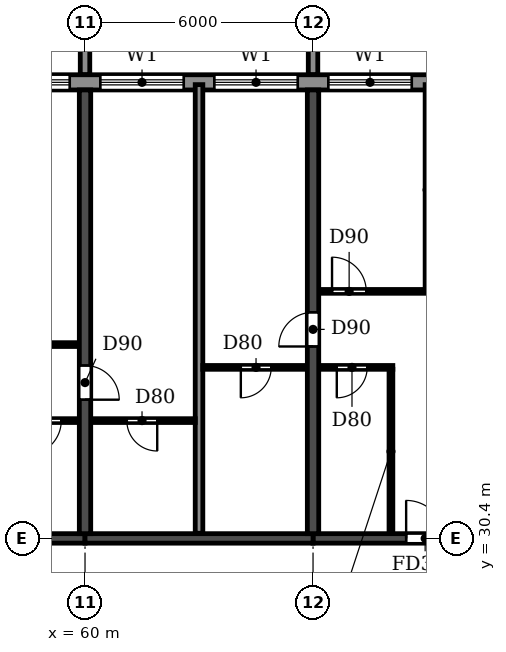
"""IFC4 building model, lengths in metres.
Left out: names, types, materials, properties, quantities, classifications, styles, units other than length and angle.
Written with IfcOpenShell. Run it as: python <this file> out.ifc"""

import sys

from ifc_helpers import new_model, si_unit, direction, frame, frame_2d, origin, place, context, subcontext, project, spatial, polyline, rectangle, outline, extrude, source, transform, mapped, element, fill, save


model = new_model("IFC4")
c1 = context("Model", 3, precision=1e-05, world=origin(), true_north=direction((0.0, 1.0)))
c2 = subcontext(c1, "Body", "Model", "MODEL_VIEW")
j1 = project(units=[si_unit("LENGTHUNIT", "METRE"), si_unit("PLANEANGLEUNIT", "RADIAN")], contexts=[c1])
p1 = place(None, origin())
s1 = spatial("IfcSite", under=j1, at=p1, CompositionType="ELEMENT")
p2 = place(p1, origin())
s2 = spatial("IfcBuilding", under=s1, at=p2, CompositionType="ELEMENT")
p3 = place(p2, frame((0.0, 0.0, 142.2)))
s3 = spatial("IfcBuildingStorey", under=s2, at=p3, CompositionType="ELEMENT", Elevation=142.2)
p4 = place(p3, frame((60.0, 30.525, 0.0), z_axis=(0.0, 0.0, 1.0), x_axis=(0.0, 1.0, 0.0)))
e1 = element("IfcWall", 1, at=p4, inside=s3, PredefinedType="SHEAR", context=c2, shape_type="SweptSolid", body=[
    extrude(rectangle(XDim=11.675, YDim=0.3, at=frame_2d((5.837, 0.0))), origin(), (0.0, 0.0, 1.0), 3.07),
])
p5 = place(p4, frame((3.525, 0.0, 0.0)))
e2 = element("IfcOpeningElement", 2, at=p5, cuts=e1, PredefinedType="OPENING", context=c2, shape_type="SweptSolid", body=[
    extrude(rectangle(XDim=0.9, YDim=2.1, at=frame_2d((0.45, 1.05))), frame((0.0, 0.16, 0.0), z_axis=(0.0, -1.0, 0.0), x_axis=(1.0, 0.0, 0.0)), (0.0, 0.0, 1.0), 0.32),
])
p6 = place(p3, frame((66.0, 30.525, 0.0), z_axis=(0.0, 0.0, 1.0), x_axis=(0.0, 1.0, 0.0)))
e3 = element("IfcWall", 3, at=p6, inside=s3, PredefinedType="SHEAR", context=c2, shape_type="SweptSolid", body=[
    extrude(rectangle(XDim=11.675, YDim=0.3, at=frame_2d((5.837, 0.0))), origin(), (0.0, 0.0, 1.0), 3.07),
])
p7 = place(p6, frame((4.925, 0.0, 0.0)))
e4 = element("IfcOpeningElement", 4, at=p7, cuts=e3, PredefinedType="OPENING", context=c2, shape_type="SweptSolid", body=[
    extrude(rectangle(XDim=0.9, YDim=2.1, at=frame_2d((0.45, 1.05))), frame((0.0, 0.16, 0.0), z_axis=(0.0, -1.0, 0.0), x_axis=(1.0, 0.0, 0.0)), (0.0, 0.0, 1.0), 0.32),
])
p8 = place(p3, frame((54.0, 30.4, 0.0), z_axis=(0.0, 0.0, 1.0), x_axis=(1.0, 0.0, 0.0)))
e5 = element("IfcWall", 5, at=p8, inside=s3, PredefinedType="SHEAR", context=c2, shape_type="SweptSolid", body=[
    extrude(rectangle(XDim=6.0, YDim=0.25, at=frame_2d((3.0, 0.0))), origin(), (0.0, 0.0, 1.0), 2.47),
])
p9 = place(p8, frame((2.45, 0.0, 0.0)))
e6 = element("IfcOpeningElement", 6, at=p9, cuts=e5, PredefinedType="OPENING", context=c2, shape_type="SweptSolid", body=[
    extrude(rectangle(XDim=1.0, YDim=2.1, at=frame_2d((0.5, 1.05))), frame((0.0, 0.135, 0.0), z_axis=(0.0, -1.0, 0.0), x_axis=(1.0, 0.0, 0.0)), (0.0, 0.0, 1.0), 0.27),
])
p10 = place(p3, frame((60.0, 30.4, 0.0), z_axis=(0.0, 0.0, 1.0), x_axis=(1.0, 0.0, 0.0)))
e7 = element("IfcWall", 7, at=p10, inside=s3, PredefinedType="SHEAR", context=c2, shape_type="SweptSolid", body=[
    extrude(rectangle(XDim=6.0, YDim=0.25, at=frame_2d((3.0, 0.0))), origin(), (0.0, 0.0, 1.0), 2.47),
])
p11 = place(p3, frame((66.0, 30.4, 0.0), z_axis=(0.0, 0.0, 1.0), x_axis=(1.0, 0.0, 0.0)))
e8 = element("IfcWall", 8, at=p11, inside=s3, PredefinedType="SHEAR", context=c2, shape_type="SweptSolid", body=[
    extrude(rectangle(XDim=6.0, YDim=0.25, at=frame_2d((3.0, 0.0))), origin(), (0.0, 0.0, 1.0), 2.47),
])
p12 = place(p11, frame((2.45, 0.0, 0.0)))
e9 = element("IfcOpeningElement", 9, at=p12, cuts=e8, PredefinedType="OPENING", context=c2, shape_type="SweptSolid", body=[
    extrude(rectangle(XDim=1.0, YDim=2.1, at=frame_2d((0.5, 1.05))), frame((0.0, 0.135, 0.0), z_axis=(0.0, -1.0, 0.0), x_axis=(1.0, 0.0, 0.0)), (0.0, 0.0, 1.0), 0.27),
])
p13 = place(p3, frame((85.317, 42.4, 0.0), z_axis=(0.0, 0.0, 1.0), x_axis=(-1.0, 0.0, 0.0)))
e10 = element("IfcWall", 10, at=p13, inside=s3, PredefinedType="STANDARD", context=c2, shape_type="SweptSolid", body=[
    extrude(rectangle(XDim=68.634, YDim=0.4, at=frame_2d((34.317, 0.0))), origin(), (0.0, 0.0, 1.0), 3.07),
])
p14 = place(p13, frame((64.717, 0.0, 0.9)))
e11 = element("IfcOpeningElement", 11, at=p14, cuts=e10, PredefinedType="OPENING", context=c2, shape_type="SweptSolid", body=[
    extrude(rectangle(XDim=2.2, YDim=1.5, at=frame_2d((1.1, 0.75))), frame((0.0, 0.21, 0.0), z_axis=(0.0, -1.0, 0.0), x_axis=(1.0, 0.0, 0.0)), (0.0, 0.0, 1.0), 0.42),
])
p15 = place(p13, frame((61.917, 0.0, 0.0)))
e12 = element("IfcOpeningElement", 12, at=p15, cuts=e10, PredefinedType="OPENING", context=c2, shape_type="SweptSolid", body=[
    extrude(rectangle(XDim=1.8, YDim=2.4, at=frame_2d((0.9, 1.2))), frame((0.0, 0.21, 0.0), z_axis=(0.0, -1.0, 0.0), x_axis=(1.0, 0.0, 0.0)), (0.0, 0.0, 1.0), 0.42),
])
p16 = place(p13, frame((58.717, 0.0, 0.9)))
e13 = element("IfcOpeningElement", 13, at=p16, cuts=e10, PredefinedType="OPENING", context=c2, shape_type="SweptSolid", body=[
    extrude(rectangle(XDim=2.2, YDim=1.5, at=frame_2d((1.1, 0.75))), frame((0.0, 0.21, 0.0), z_axis=(0.0, -1.0, 0.0), x_axis=(1.0, 0.0, 0.0)), (0.0, 0.0, 1.0), 0.42),
])
p17 = place(p13, frame((55.917, 0.0, 0.0)))
e14 = element("IfcOpeningElement", 14, at=p17, cuts=e10, PredefinedType="OPENING", context=c2, shape_type="SweptSolid", body=[
    extrude(rectangle(XDim=1.8, YDim=2.4, at=frame_2d((0.9, 1.2))), frame((0.0, 0.21, 0.0), z_axis=(0.0, -1.0, 0.0), x_axis=(1.0, 0.0, 0.0)), (0.0, 0.0, 1.0), 0.42),
])
p18 = place(p13, frame((52.717, 0.0, 0.9)))
e15 = element("IfcOpeningElement", 15, at=p18, cuts=e10, PredefinedType="OPENING", context=c2, shape_type="SweptSolid", body=[
    extrude(rectangle(XDim=2.2, YDim=1.5, at=frame_2d((1.1, 0.75))), frame((0.0, 0.21, 0.0), z_axis=(0.0, -1.0, 0.0), x_axis=(1.0, 0.0, 0.0)), (0.0, 0.0, 1.0), 0.42),
])
p19 = place(p13, frame((49.717, 0.0, 0.9)))
e16 = element("IfcOpeningElement", 16, at=p19, cuts=e10, PredefinedType="OPENING", context=c2, shape_type="SweptSolid", body=[
    extrude(rectangle(XDim=2.2, YDim=1.5, at=frame_2d((1.1, 0.75))), frame((0.0, 0.21, 0.0), z_axis=(0.0, -1.0, 0.0), x_axis=(1.0, 0.0, 0.0)), (0.0, 0.0, 1.0), 0.42),
])
p20 = place(p13, frame((46.917, 0.0, 0.0)))
e17 = element("IfcOpeningElement", 17, at=p20, cuts=e10, PredefinedType="OPENING", context=c2, shape_type="SweptSolid", body=[
    extrude(rectangle(XDim=1.8, YDim=2.4, at=frame_2d((0.9, 1.2))), frame((0.0, 0.21, 0.0), z_axis=(0.0, -1.0, 0.0), x_axis=(1.0, 0.0, 0.0)), (0.0, 0.0, 1.0), 0.42),
])
p21 = place(p13, frame((43.717, 0.0, 0.9)))
e18 = element("IfcOpeningElement", 18, at=p21, cuts=e10, PredefinedType="OPENING", context=c2, shape_type="SweptSolid", body=[
    extrude(rectangle(XDim=2.2, YDim=1.5, at=frame_2d((1.1, 0.75))), frame((0.0, 0.21, 0.0), z_axis=(0.0, -1.0, 0.0), x_axis=(1.0, 0.0, 0.0)), (0.0, 0.0, 1.0), 0.42),
])
p22 = place(p13, frame((40.717, 0.0, 0.9)))
e19 = element("IfcOpeningElement", 19, at=p22, cuts=e10, PredefinedType="OPENING", context=c2, shape_type="SweptSolid", body=[
    extrude(rectangle(XDim=2.2, YDim=1.5, at=frame_2d((1.1, 0.75))), frame((0.0, 0.21, 0.0), z_axis=(0.0, -1.0, 0.0), x_axis=(1.0, 0.0, 0.0)), (0.0, 0.0, 1.0), 0.42),
])
p23 = place(p13, frame((37.717, 0.0, 0.9)))
e20 = element("IfcOpeningElement", 20, at=p23, cuts=e10, PredefinedType="OPENING", context=c2, shape_type="SweptSolid", body=[
    extrude(rectangle(XDim=2.2, YDim=1.5, at=frame_2d((1.1, 0.75))), frame((0.0, 0.21, 0.0), z_axis=(0.0, -1.0, 0.0), x_axis=(1.0, 0.0, 0.0)), (0.0, 0.0, 1.0), 0.42),
])
p24 = place(p13, frame((34.717, 0.0, 0.9)))
e21 = element("IfcOpeningElement", 21, at=p24, cuts=e10, PredefinedType="OPENING", context=c2, shape_type="SweptSolid", body=[
    extrude(rectangle(XDim=2.2, YDim=1.5, at=frame_2d((1.1, 0.75))), frame((0.0, 0.21, 0.0), z_axis=(0.0, -1.0, 0.0), x_axis=(1.0, 0.0, 0.0)), (0.0, 0.0, 1.0), 0.42),
])
p25 = place(p13, frame((31.917, 0.0, 0.0)))
e22 = element("IfcOpeningElement", 22, at=p25, cuts=e10, PredefinedType="OPENING", context=c2, shape_type="SweptSolid", body=[
    extrude(rectangle(XDim=1.8, YDim=2.4, at=frame_2d((0.9, 1.2))), frame((0.0, 0.21, 0.0), z_axis=(0.0, -1.0, 0.0), x_axis=(1.0, 0.0, 0.0)), (0.0, 0.0, 1.0), 0.42),
])
p26 = place(p13, frame((28.917, 0.0, 0.0)))
e23 = element("IfcOpeningElement", 23, at=p26, cuts=e10, PredefinedType="OPENING", context=c2, shape_type="SweptSolid", body=[
    extrude(rectangle(XDim=1.8, YDim=2.4, at=frame_2d((0.9, 1.2))), frame((0.0, 0.21, 0.0), z_axis=(0.0, -1.0, 0.0), x_axis=(1.0, 0.0, 0.0)), (0.0, 0.0, 1.0), 0.42),
])
p27 = place(p13, frame((25.717, 0.0, 0.9)))
e24 = element("IfcOpeningElement", 24, at=p27, cuts=e10, PredefinedType="OPENING", context=c2, shape_type="SweptSolid", body=[
    extrude(rectangle(XDim=2.2, YDim=1.5, at=frame_2d((1.1, 0.75))), frame((0.0, 0.21, 0.0), z_axis=(0.0, -1.0, 0.0), x_axis=(1.0, 0.0, 0.0)), (0.0, 0.0, 1.0), 0.42),
])
p28 = place(p13, frame((22.717, 0.0, 0.9)))
e25 = element("IfcOpeningElement", 25, at=p28, cuts=e10, PredefinedType="OPENING", context=c2, shape_type="SweptSolid", body=[
    extrude(rectangle(XDim=2.2, YDim=1.5, at=frame_2d((1.1, 0.75))), frame((0.0, 0.21, 0.0), z_axis=(0.0, -1.0, 0.0), x_axis=(1.0, 0.0, 0.0)), (0.0, 0.0, 1.0), 0.42),
])
p29 = place(p13, frame((19.717, 0.0, 0.9)))
e26 = element("IfcOpeningElement", 26, at=p29, cuts=e10, PredefinedType="OPENING", context=c2, shape_type="SweptSolid", body=[
    extrude(rectangle(XDim=2.2, YDim=1.5, at=frame_2d((1.1, 0.75))), frame((0.0, 0.21, 0.0), z_axis=(0.0, -1.0, 0.0), x_axis=(1.0, 0.0, 0.0)), (0.0, 0.0, 1.0), 0.42),
])
p30 = place(p13, frame((16.717, 0.0, 0.9)))
e27 = element("IfcOpeningElement", 27, at=p30, cuts=e10, PredefinedType="OPENING", context=c2, shape_type="SweptSolid", body=[
    extrude(rectangle(XDim=2.2, YDim=1.5, at=frame_2d((1.1, 0.75))), frame((0.0, 0.21, 0.0), z_axis=(0.0, -1.0, 0.0), x_axis=(1.0, 0.0, 0.0)), (0.0, 0.0, 1.0), 0.42),
])
p31 = place(p13, frame((13.917, 0.0, 0.0)))
e28 = element("IfcOpeningElement", 28, at=p31, cuts=e10, PredefinedType="OPENING", context=c2, shape_type="SweptSolid", body=[
    extrude(rectangle(XDim=1.8, YDim=2.4, at=frame_2d((0.9, 1.2))), frame((0.0, 0.21, 0.0), z_axis=(0.0, -1.0, 0.0), x_axis=(1.0, 0.0, 0.0)), (0.0, 0.0, 1.0), 0.42),
])
p32 = place(p13, frame((10.917, 0.0, 0.0)))
e29 = element("IfcOpeningElement", 29, at=p32, cuts=e10, PredefinedType="OPENING", context=c2, shape_type="SweptSolid", body=[
    extrude(rectangle(XDim=1.8, YDim=2.4, at=frame_2d((0.9, 1.2))), frame((0.0, 0.21, 0.0), z_axis=(0.0, -1.0, 0.0), x_axis=(1.0, 0.0, 0.0)), (0.0, 0.0, 1.0), 0.42),
])
p33 = place(p13, frame((7.717, 0.0, 0.9)))
e30 = element("IfcOpeningElement", 30, at=p33, cuts=e10, PredefinedType="OPENING", context=c2, shape_type="SweptSolid", body=[
    extrude(rectangle(XDim=2.2, YDim=1.5, at=frame_2d((1.1, 0.75))), frame((0.0, 0.21, 0.0), z_axis=(0.0, -1.0, 0.0), x_axis=(1.0, 0.0, 0.0)), (0.0, 0.0, 1.0), 0.42),
])
p34 = place(p13, frame((4.717, 0.0, 0.9)))
e31 = element("IfcOpeningElement", 31, at=p34, cuts=e10, PredefinedType="OPENING", context=c2, shape_type="SweptSolid", body=[
    extrude(rectangle(XDim=2.2, YDim=1.5, at=frame_2d((1.1, 0.75))), frame((0.0, 0.21, 0.0), z_axis=(0.0, -1.0, 0.0), x_axis=(1.0, 0.0, 0.0)), (0.0, 0.0, 1.0), 0.42),
])
p35 = place(p13, frame((1.917, 0.0, 0.0)))
e32 = element("IfcOpeningElement", 32, at=p35, cuts=e10, PredefinedType="OPENING", context=c2, shape_type="SweptSolid", body=[
    extrude(rectangle(XDim=1.8, YDim=2.4, at=frame_2d((0.9, 1.2))), frame((0.0, 0.21, 0.0), z_axis=(0.0, -1.0, 0.0), x_axis=(1.0, 0.0, 0.0)), (0.0, 0.0, 1.0), 0.42),
])
m1 = source(origin(), c2, "Body", "SweptSolid", [
    extrude(outline(polyline([(0.0, 0.0), (0.25, 0.0), (0.25, 3.1), (0.0, 3.1), (0.0, 0.0)])), origin(), (0.0, 0.0, 1.0), 3.1),
])
for number, where in (
    (33, (59.875, 42.6, 0.0)),
    (34, (65.875, 42.6, 0.0)),
):
    element("IfcWall", number, at=place(p3, frame(where)), inside=s3, PredefinedType="STANDARD", context=c2, shape_type="MappedRepresentation", body=[
        mapped(m1, transform((0.0, 0.0, 0.0))),
    ])
p36 = place(p3, frame((63.0, 30.535, 0.0), z_axis=(0.0, 0.0, 1.0), x_axis=(0.0, 1.0, 0.0)))
e35 = element("IfcWall", 35, at=p36, inside=s3, PredefinedType="PARTITIONING", context=c2, shape_type="SweptSolid", body=[
    extrude(rectangle(XDim=11.805, YDim=0.2, at=frame_2d((5.903, 0.0))), origin(), (0.0, 0.0, 1.0), 3.07),
])
p37 = place(p3, frame((57.8, 33.5, 0.0), z_axis=(0.0, 0.0, 1.0), x_axis=(1.0, 0.0, 0.0)))
e36 = element("IfcWall", 36, at=p37, inside=s3, PredefinedType="PARTITIONING", context=c2, shape_type="SweptSolid", body=[
    extrude(rectangle(XDim=2.04, YDim=0.1, at=frame_2d((1.02, 0.0))), origin(), (0.0, 0.0, 1.0), 3.07),
])
p38 = place(p37, frame((0.675, 0.0, 0.0)))
e37 = element("IfcOpeningElement", 37, at=p38, cuts=e36, PredefinedType="OPENING", context=c2, shape_type="SweptSolid", body=[
    extrude(rectangle(XDim=0.9, YDim=2.1, at=frame_2d((0.45, 1.05))), frame((0.0, 0.06, 0.0), z_axis=(0.0, -1.0, 0.0), x_axis=(1.0, 0.0, 0.0)), (0.0, 0.0, 1.0), 0.12),
])
p39 = place(p3, frame((60.16, 33.5, 0.0), z_axis=(0.0, 0.0, 1.0), x_axis=(1.0, 0.0, 0.0)))
e38 = element("IfcWall", 38, at=p39, inside=s3, PredefinedType="PARTITIONING", context=c2, shape_type="SweptSolid", body=[
    extrude(rectangle(XDim=2.74, YDim=0.1, at=frame_2d((1.37, 0.0))), origin(), (0.0, 0.0, 1.0), 3.07),
])
p40 = place(p39, frame((0.94, 0.0, 0.0)))
e39 = element("IfcOpeningElement", 39, at=p40, cuts=e38, PredefinedType="OPENING", context=c2, shape_type="SweptSolid", body=[
    extrude(rectangle(XDim=0.8, YDim=2.1, at=frame_2d((0.4, 1.05))), frame((0.0, 0.06, 0.0), z_axis=(0.0, -1.0, 0.0), x_axis=(1.0, 0.0, 0.0)), (0.0, 0.0, 1.0), 0.12),
])
p41 = place(p3, frame((63.1, 34.9, 0.0), z_axis=(0.0, 0.0, 1.0), x_axis=(1.0, 0.0, 0.0)))
e40 = element("IfcWall", 40, at=p41, inside=s3, PredefinedType="PARTITIONING", context=c2, shape_type="SweptSolid", body=[
    extrude(rectangle(XDim=2.74, YDim=0.1, at=frame_2d((1.37, 0.0))), origin(), (0.0, 0.0, 1.0), 3.07),
])
p42 = place(p41, frame((1.0, 0.0, 0.0)))
e41 = element("IfcOpeningElement", 41, at=p42, cuts=e40, PredefinedType="OPENING", context=c2, shape_type="SweptSolid", body=[
    extrude(rectangle(XDim=0.8, YDim=2.1, at=frame_2d((0.4, 1.05))), frame((0.0, 0.06, 0.0), z_axis=(0.0, -1.0, 0.0), x_axis=(1.0, 0.0, 0.0)), (0.0, 0.0, 1.0), 0.12),
])
p43 = place(p3, frame((66.16, 34.9, 0.0), z_axis=(0.0, 0.0, 1.0), x_axis=(1.0, 0.0, 0.0)))
e42 = element("IfcWall", 42, at=p43, inside=s3, PredefinedType="PARTITIONING", context=c2, shape_type="SweptSolid", body=[
    extrude(rectangle(XDim=1.94, YDim=0.1, at=frame_2d((0.97, 0.0))), origin(), (0.0, 0.0, 1.0), 3.07),
])
p44 = place(p43, frame((0.465, 0.0, 0.0)))
e43 = element("IfcOpeningElement", 43, at=p44, cuts=e42, PredefinedType="OPENING", context=c2, shape_type="SweptSolid", body=[
    extrude(rectangle(XDim=0.8, YDim=2.1, at=frame_2d((0.4, 1.05))), frame((0.0, 0.06, 0.0), z_axis=(0.0, -1.0, 0.0), x_axis=(1.0, 0.0, 0.0)), (0.0, 0.0, 1.0), 0.12),
])
p45 = place(p3, frame((56.95, 35.5, 0.0), z_axis=(0.0, 0.0, 1.0), x_axis=(1.0, 0.0, 0.0)))
e44 = element("IfcWall", 44, at=p45, inside=s3, PredefinedType="PARTITIONING", context=c2, shape_type="SweptSolid", body=[
    extrude(rectangle(XDim=2.89, YDim=0.1, at=frame_2d((1.445, 0.0))), origin(), (0.0, 0.0, 1.0), 3.07),
])
p46 = place(p45, frame((0.55, 0.0, 0.0)))
e45 = element("IfcOpeningElement", 45, at=p46, cuts=e44, PredefinedType="OPENING", context=c2, shape_type="SweptSolid", body=[
    extrude(rectangle(XDim=0.9, YDim=2.1, at=frame_2d((0.45, 1.05))), frame((0.0, 0.06, 0.0), z_axis=(0.0, -1.0, 0.0), x_axis=(1.0, 0.0, 0.0)), (0.0, 0.0, 1.0), 0.12),
])
p47 = place(p3, frame((66.16, 36.9, 0.0), z_axis=(0.0, 0.0, 1.0), x_axis=(1.0, 0.0, 0.0)))
e46 = element("IfcWall", 46, at=p47, inside=s3, PredefinedType="PARTITIONING", context=c2, shape_type="SweptSolid", body=[
    extrude(rectangle(XDim=2.89, YDim=0.1, at=frame_2d((1.445, 0.0))), origin(), (0.0, 0.0, 1.0), 3.07),
])
p48 = place(p47, frame((0.34, 0.0, 0.0)))
e47 = element("IfcOpeningElement", 47, at=p48, cuts=e46, PredefinedType="OPENING", context=c2, shape_type="SweptSolid", body=[
    extrude(rectangle(XDim=0.9, YDim=2.1, at=frame_2d((0.45, 1.05))), frame((0.0, 0.06, 0.0), z_axis=(0.0, -1.0, 0.0), x_axis=(1.0, 0.0, 0.0)), (0.0, 0.0, 1.0), 0.12),
])
p49 = place(p3, frame((68.05, 30.535, 0.0), z_axis=(0.0, 0.0, 1.0), x_axis=(0.0, 1.0, 0.0)))
e48 = element("IfcWall", 48, at=p49, inside=s3, PredefinedType="PARTITIONING", context=c2, shape_type="SweptSolid", body=[
    extrude(rectangle(XDim=4.315, YDim=0.1, at=frame_2d((2.158, 0.0))), origin(), (0.0, 0.0, 1.0), 3.07),
])
p50 = place(p3, frame((69.0, 36.95, 0.0), z_axis=(0.0, 0.0, 1.0), x_axis=(0.0, 1.0, 0.0)))
e49 = element("IfcWall", 49, at=p50, inside=s3, PredefinedType="PARTITIONING", context=c2, shape_type="SweptSolid", body=[
    extrude(rectangle(XDim=5.39, YDim=0.1, at=frame_2d((2.695, 0.0))), origin(), (0.0, 0.0, 1.0), 3.07),
])
p51 = place(p27, origin())
e50 = element("IfcWindow", 50, at=p51, inside=s3, PartitioningType="DOUBLE_PANEL_HORIZONTAL", PredefinedType="WINDOW", context=c2, shape_type="SweptSolid", body=[
    extrude(rectangle(XDim=2.2, YDim=1.5, at=frame_2d((1.1, 0.75))), frame((0.0, 0.03, 0.0), z_axis=(0.0, -1.0, 0.0), x_axis=(1.0, 0.0, 0.0)), (0.0, 0.0, 1.0), 0.06),
])
fill(e24, e50)
p52 = place(p28, origin())
e51 = element("IfcWindow", 51, at=p52, inside=s3, PartitioningType="DOUBLE_PANEL_HORIZONTAL", PredefinedType="WINDOW", context=c2, shape_type="SweptSolid", body=[
    extrude(rectangle(XDim=2.2, YDim=1.5, at=frame_2d((1.1, 0.75))), frame((0.0, 0.03, 0.0), z_axis=(0.0, -1.0, 0.0), x_axis=(1.0, 0.0, 0.0)), (0.0, 0.0, 1.0), 0.06),
])
fill(e25, e51)
p53 = place(p29, origin())
e52 = element("IfcWindow", 52, at=p53, inside=s3, PartitioningType="DOUBLE_PANEL_HORIZONTAL", PredefinedType="WINDOW", context=c2, shape_type="SweptSolid", body=[
    extrude(rectangle(XDim=2.2, YDim=1.5, at=frame_2d((1.1, 0.75))), frame((0.0, 0.03, 0.0), z_axis=(0.0, -1.0, 0.0), x_axis=(1.0, 0.0, 0.0)), (0.0, 0.0, 1.0), 0.06),
])
fill(e26, e52)
p54 = place(p30, origin())
e53 = element("IfcWindow", 53, at=p54, inside=s3, PartitioningType="DOUBLE_PANEL_HORIZONTAL", PredefinedType="WINDOW", context=c2, shape_type="SweptSolid", body=[
    extrude(rectangle(XDim=2.2, YDim=1.5, at=frame_2d((1.1, 0.75))), frame((0.0, 0.03, 0.0), z_axis=(0.0, -1.0, 0.0), x_axis=(1.0, 0.0, 0.0)), (0.0, 0.0, 1.0), 0.06),
])
fill(e27, e53)
p55 = place(p40, frame((0.8, 0.0, 0.0), z_axis=(0.0, 0.0, 1.0), x_axis=(-1.0, 0.0, 0.0)))
e54 = element("IfcDoor", 54, at=p55, inside=s3, OperationType="SINGLE_SWING_LEFT", PredefinedType="DOOR", context=c2, shape_type="SweptSolid", body=[
    extrude(rectangle(XDim=0.8, YDim=2.1, at=frame_2d((0.4, 1.05))), frame((0.0, 0.025, 0.0), z_axis=(0.0, -1.0, 0.0), x_axis=(1.0, 0.0, 0.0)), (0.0, 0.0, 1.0), 0.05),
])
fill(e39, e54)
p56 = place(p38, frame((0.9, 0.0, 0.0), z_axis=(0.0, 0.0, 1.0), x_axis=(-1.0, 0.0, 0.0)))
e55 = element("IfcDoor", 55, at=p56, inside=s3, OperationType="SINGLE_SWING_RIGHT", PredefinedType="DOOR", context=c2, shape_type="SweptSolid", body=[
    extrude(rectangle(XDim=0.9, YDim=2.1, at=frame_2d((0.45, 1.05))), frame((0.0, 0.025, 0.0), z_axis=(0.0, -1.0, 0.0), x_axis=(1.0, 0.0, 0.0)), (0.0, 0.0, 1.0), 0.05),
])
fill(e37, e55)
p57 = place(p5, frame((0.9, 0.0, 0.0), z_axis=(0.0, 0.0, 1.0), x_axis=(-1.0, 0.0, 0.0)))
e56 = element("IfcDoor", 56, at=p57, inside=s3, OperationType="SINGLE_SWING_RIGHT", PredefinedType="DOOR", context=c2, shape_type="SweptSolid", body=[
    extrude(rectangle(XDim=0.9, YDim=2.1, at=frame_2d((0.45, 1.05))), frame((0.0, 0.025, 0.0), z_axis=(0.0, -1.0, 0.0), x_axis=(1.0, 0.0, 0.0)), (0.0, 0.0, 1.0), 0.05),
])
fill(e2, e56)
p58 = place(p42, frame((0.8, 0.0, 0.0), z_axis=(0.0, 0.0, 1.0), x_axis=(-1.0, 0.0, 0.0)))
e57 = element("IfcDoor", 57, at=p58, inside=s3, OperationType="SINGLE_SWING_RIGHT", PredefinedType="DOOR", context=c2, shape_type="SweptSolid", body=[
    extrude(rectangle(XDim=0.8, YDim=2.1, at=frame_2d((0.4, 1.05))), frame((0.0, 0.025, 0.0), z_axis=(0.0, -1.0, 0.0), x_axis=(1.0, 0.0, 0.0)), (0.0, 0.0, 1.0), 0.05),
])
fill(e41, e57)
p59 = place(p7, origin())
e58 = element("IfcDoor", 58, at=p59, inside=s3, OperationType="SINGLE_SWING_LEFT", PredefinedType="DOOR", context=c2, shape_type="SweptSolid", body=[
    extrude(rectangle(XDim=0.9, YDim=2.1, at=frame_2d((0.45, 1.05))), frame((0.0, 0.025, 0.0), z_axis=(0.0, -1.0, 0.0), x_axis=(1.0, 0.0, 0.0)), (0.0, 0.0, 1.0), 0.05),
])
fill(e4, e58)
p60 = place(p48, origin())
e59 = element("IfcDoor", 59, at=p60, inside=s3, OperationType="SINGLE_SWING_LEFT", PredefinedType="DOOR", context=c2, shape_type="SweptSolid", body=[
    extrude(rectangle(XDim=0.9, YDim=2.1, at=frame_2d((0.45, 1.05))), frame((0.0, 0.025, 0.0), z_axis=(0.0, -1.0, 0.0), x_axis=(1.0, 0.0, 0.0)), (0.0, 0.0, 1.0), 0.05),
])
fill(e47, e59)
p61 = place(p44, frame((0.8, 0.0, 0.0), z_axis=(0.0, 0.0, 1.0), x_axis=(-1.0, 0.0, 0.0)))
e60 = element("IfcDoor", 60, at=p61, inside=s3, OperationType="SINGLE_SWING_RIGHT", PredefinedType="DOOR", context=c2, shape_type="SweptSolid", body=[
    extrude(rectangle(XDim=0.8, YDim=2.1, at=frame_2d((0.4, 1.05))), frame((0.0, 0.025, 0.0), z_axis=(0.0, -1.0, 0.0), x_axis=(1.0, 0.0, 0.0)), (0.0, 0.0, 1.0), 0.05),
])
fill(e43, e60)
p62 = place(p12, origin())
e61 = element("IfcDoor", 61, at=p62, inside=s3, OperationType="SINGLE_SWING_LEFT", PredefinedType="DOOR", context=c2, shape_type="SweptSolid", body=[
    extrude(rectangle(XDim=1.0, YDim=2.1, at=frame_2d((0.5, 1.05))), frame((0.0, 0.025, 0.0), z_axis=(0.0, -1.0, 0.0), x_axis=(1.0, 0.0, 0.0)), (0.0, 0.0, 1.0), 0.05),
])
fill(e9, e61)
save(model, sys.argv[1])
